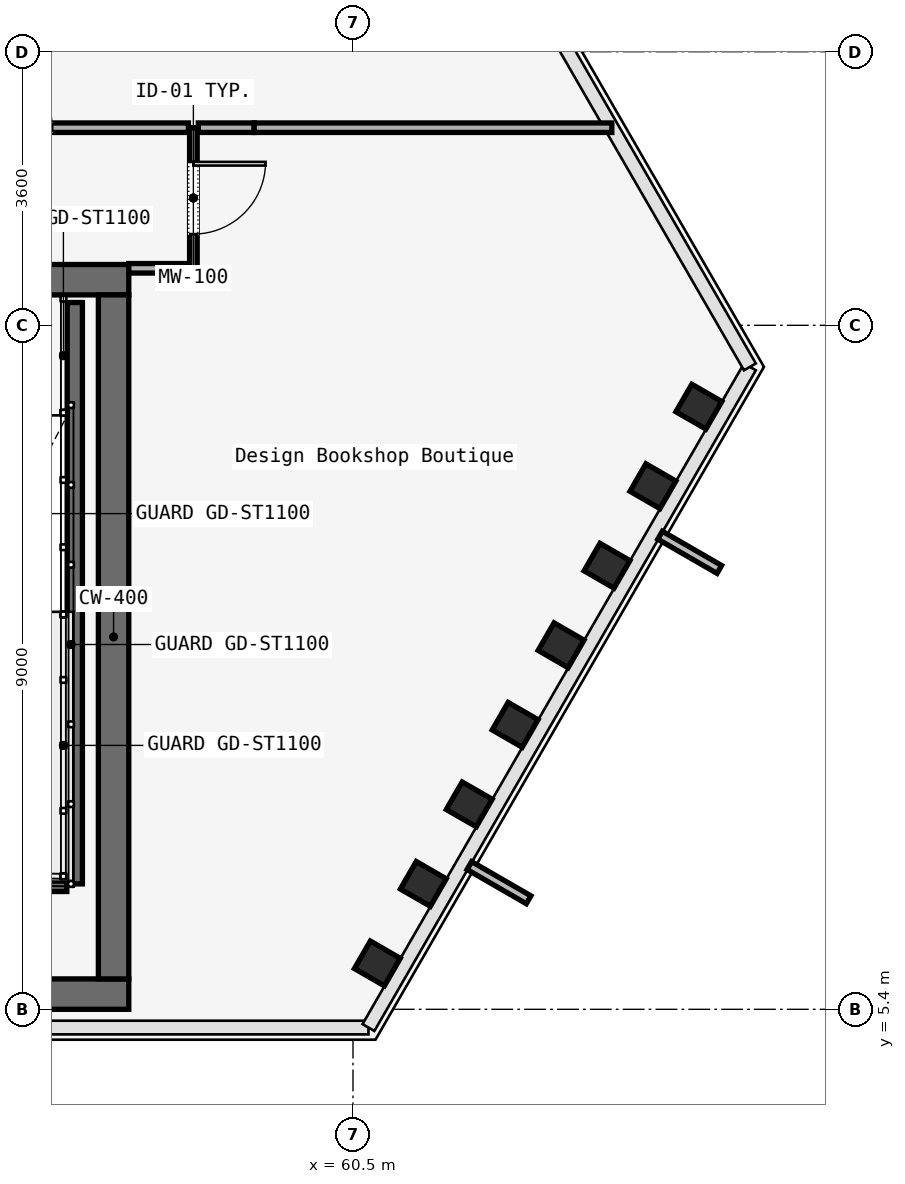
"""IFC4 building model, lengths in metres.
Left out: names, types, materials, properties, quantities, classifications, styles, units other than length and angle.
Written with IfcOpenShell. Run it as: python <this file> out.ifc"""

import sys

from ifc_helpers import new_model, si_unit, direction, frame, frame_2d, origin, origin_2d, place, context, subcontext, project, spatial, rectangle, i_section, extrude, element, fill, save


model = new_model("IFC4")
c1 = context("Model", 3, precision=1e-05, world=origin(), true_north=direction((0.0, 1.0)))
c2 = subcontext(c1, "Body", "Model", "MODEL_VIEW")
j1 = project(units=[si_unit("LENGTHUNIT", "METRE"), si_unit("PLANEANGLEUNIT", "RADIAN")], contexts=[c1])
p1 = place(None, origin())
s1 = spatial("IfcSite", under=j1, at=p1, CompositionType="ELEMENT")
p2 = place(p1, origin())
s2 = spatial("IfcBuilding", under=s1, at=p2, CompositionType="ELEMENT")
p3 = place(p2, frame((0.0, 0.0, 180.2)))
s3 = spatial("IfcBuildingStorey", under=s2, at=p3, CompositionType="ELEMENT", Elevation=180.2)
p4 = place(p3, frame((26.45, 15.0, 0.0), z_axis=(0.0, 0.0, 1.0), x_axis=(1.0, 0.0, 0.0)))
e1 = element("IfcWall", 1, at=p4, inside=s3, PredefinedType="SOLIDWALL", context=c2, shape_type="SweptSolid", body=[
    extrude(rectangle(XDim=31.1, YDim=0.4, at=frame_2d((15.55, 0.0))), origin(), (0.0, 0.0, 1.0), 3.58),
])
p5 = place(p4, frame((1.65, 0.0, 0.0)))
e2 = element("IfcOpeningElement", 2, at=p5, cuts=e1, PredefinedType="OPENING", context=c2, shape_type="SweptSolid", body=[
    extrude(rectangle(XDim=1.1, YDim=2.2, at=frame_2d((0.55, 1.1))), frame((0.0, 0.2, 0.0), z_axis=(0.0, -1.0, 0.0), x_axis=(1.0, 0.0, 0.0)), (0.0, 0.0, 1.0), 0.4),
])
p6 = place(p4, frame((13.65, 0.0, 0.0)))
e3 = element("IfcOpeningElement", 3, at=p6, cuts=e1, PredefinedType="OPENING", context=c2, shape_type="SweptSolid", body=[
    extrude(rectangle(XDim=1.1, YDim=2.2, at=frame_2d((0.55, 1.1))), frame((0.0, 0.2, 0.0), z_axis=(0.0, -1.0, 0.0), x_axis=(1.0, 0.0, 0.0)), (0.0, 0.0, 1.0), 0.4),
])
p7 = place(p4, frame((25.55, 0.0, 0.0)))
e4 = element("IfcOpeningElement", 4, at=p7, cuts=e1, PredefinedType="OPENING", context=c2, shape_type="SweptSolid", body=[
    extrude(rectangle(XDim=1.1, YDim=2.2, at=frame_2d((0.55, 1.1))), frame((0.0, 0.2, 0.0), z_axis=(0.0, -1.0, 0.0), x_axis=(1.0, 0.0, 0.0)), (0.0, 0.0, 1.0), 0.4),
])
p8 = place(p4, frame((10.7, 0.0, 0.0)))
e5 = element("IfcOpeningElement", 5, at=p8, cuts=e1, PredefinedType="OPENING", context=c2, shape_type="SweptSolid", body=[
    extrude(rectangle(XDim=1.4, YDim=2.2, at=frame_2d((0.7, 1.1))), frame((0.0, 0.2, 0.0), z_axis=(0.0, -1.0, 0.0), x_axis=(1.0, 0.0, 0.0)), (0.0, 0.0, 1.0), 0.4),
])
p9 = place(p4, frame((19.35, 0.0, 0.0)))
e6 = element("IfcOpeningElement", 6, at=p9, cuts=e1, PredefinedType="OPENING", context=c2, shape_type="SweptSolid", body=[
    extrude(rectangle(XDim=1.1, YDim=2.2, at=frame_2d((0.55, 1.1))), frame((0.0, 0.2, 0.0), z_axis=(0.0, -1.0, 0.0), x_axis=(1.0, 0.0, 0.0)), (0.0, 0.0, 1.0), 0.4),
])
p10 = place(p4, frame((21.4, 0.0, 0.0)))
e7 = element("IfcOpeningElement", 7, at=p10, cuts=e1, PredefinedType="OPENING", context=c2, shape_type="SweptSolid", body=[
    extrude(rectangle(XDim=0.9, YDim=2.1, at=frame_2d((0.45, 1.05))), frame((0.0, 0.2, 0.0), z_axis=(0.0, -1.0, 0.0), x_axis=(1.0, 0.0, 0.0)), (0.0, 0.0, 1.0), 0.4),
])
p11 = place(p4, frame((23.35, 0.0, 0.0)))
e8 = element("IfcOpeningElement", 8, at=p11, cuts=e1, PredefinedType="OPENING", context=c2, shape_type="SweptSolid", body=[
    extrude(rectangle(XDim=1.3, YDim=2.3, at=frame_2d((0.65, 1.15))), frame((0.0, 0.2, 0.0), z_axis=(0.0, -1.0, 0.0), x_axis=(1.0, 0.0, 0.0)), (0.0, 0.0, 1.0), 0.4),
])
p12 = place(p3, frame((26.45, 5.6, 0.0), z_axis=(0.0, 0.0, 1.0), x_axis=(1.0, 0.0, 0.0)))
e9 = element("IfcWall", 9, at=p12, inside=s3, PredefinedType="SOLIDWALL", context=c2, shape_type="SweptSolid", body=[
    extrude(rectangle(XDim=31.1, YDim=0.4, at=frame_2d((15.55, 0.0))), origin(), (0.0, 0.0, 1.0), 3.58),
])
p13 = place(p3, frame((57.35, 5.8, 0.0), z_axis=(0.0, 0.0, 1.0), x_axis=(0.0, 1.0, 0.0)))
e10 = element("IfcWall", 10, at=p13, inside=s3, PredefinedType="SOLIDWALL", context=c2, shape_type="SweptSolid", body=[
    extrude(rectangle(XDim=9.0, YDim=0.4, at=frame_2d((4.5, 0.0))), origin(), (0.0, 0.0, 1.0), 3.58),
])
p14 = place(p3, frame((60.821, 6.003, 0.0), z_axis=(0.08148987416, -0.008631537964, 0.9966367929), x_axis=(-0.805645164111, 0.588132248959, 0.070967085883)))
e11 = element("IfcColumn", 11, at=p14, inside=s3, PredefinedType="COLUMN", context=c2, shape_type="SweptSolid", body=[
    extrude(i_section(OverallWidth=0.418, OverallDepth=0.455, WebThickness=0.042, FlangeThickness=0.052, FilletRadius=0.015, at=origin_2d()), origin(), (0.0, 0.0, 1.0), 3.592),
])
p15 = place(p3, frame((61.425, 7.05, 0.0), z_axis=(0.071600422233, -0.025702715673, 0.99710217628), x_axis=(-0.643804106231, 0.762348893393, 0.065881997106)))
e12 = element("IfcColumn", 12, at=p15, inside=s3, PredefinedType="COLUMN", context=c2, shape_type="SweptSolid", body=[
    extrude(i_section(OverallWidth=0.418, OverallDepth=0.455, WebThickness=0.042, FlangeThickness=0.052, FilletRadius=0.015, at=origin_2d()), origin(), (0.0, 0.0, 1.0), 3.591),
])
p16 = place(p3, frame((62.029, 8.096, 0.0), z_axis=(0.061677321866, -0.042908919622, 0.997173371377), x_axis=(-0.423353805022, 0.903624703741, 0.065068814049)))
e13 = element("IfcColumn", 13, at=p16, inside=s3, PredefinedType="COLUMN", context=c2, shape_type="SweptSolid", body=[
    extrude(i_section(OverallWidth=0.418, OverallDepth=0.455, WebThickness=0.042, FlangeThickness=0.052, FilletRadius=0.015, at=origin_2d()), origin(), (0.0, 0.0, 1.0), 3.59),
])
p17 = place(p3, frame((62.634, 9.143, 0.0), z_axis=(0.051732394195, -0.060093871838, 0.996851285779), x_axis=(-0.184296323413, 0.980468882548, 0.068670485153)))
e14 = element("IfcColumn", 14, at=p17, inside=s3, PredefinedType="COLUMN", context=c2, shape_type="SweptSolid", body=[
    extrude(i_section(OverallWidth=0.418, OverallDepth=0.455, WebThickness=0.042, FlangeThickness=0.052, FilletRadius=0.015, at=origin_2d()), origin(), (0.0, 0.0, 1.0), 3.591),
])
p18 = place(p3, frame((63.238, 10.19, 0.0), z_axis=(0.041845245967, -0.077237085495, 0.996134231926), x_axis=(0.028682489394, 0.996689455554, 0.076075252148)))
e15 = element("IfcColumn", 15, at=p18, inside=s3, PredefinedType="COLUMN", context=c2, shape_type="SweptSolid", body=[
    extrude(i_section(OverallWidth=0.418, OverallDepth=0.455, WebThickness=0.042, FlangeThickness=0.052, FilletRadius=0.015, at=origin_2d()), origin(), (0.0, 0.0, 1.0), 3.594),
])
p19 = place(p3, frame((63.842, 11.236, 0.0), z_axis=(0.031892225562, -0.094251704904, 0.995037437522), x_axis=(0.197419018673, 0.976524632367, 0.086170606627)))
e16 = element("IfcColumn", 16, at=p19, inside=s3, PredefinedType="COLUMN", context=c2, shape_type="SweptSolid", body=[
    extrude(i_section(OverallWidth=0.418, OverallDepth=0.455, WebThickness=0.042, FlangeThickness=0.052, FilletRadius=0.015, at=origin_2d()), origin(), (0.0, 0.0, 1.0), 3.598),
])
p20 = place(p3, frame((64.446, 12.283, 0.0), z_axis=(0.021952406757, -0.111252629304, 0.993549668769), x_axis=(0.323971098461, 0.940956128411, 0.098205355084)))
e17 = element("IfcColumn", 17, at=p20, inside=s3, PredefinedType="COLUMN", context=c2, shape_type="SweptSolid", body=[
    extrude(i_section(OverallWidth=0.418, OverallDepth=0.455, WebThickness=0.042, FlangeThickness=0.052, FilletRadius=0.015, at=origin_2d()), origin(), (0.0, 0.0, 1.0), 3.603),
])
p21 = place(p3, frame((65.051, 13.33, 0.0), z_axis=(0.012037594099, -0.1281530383, 0.991681347562), x_axis=(0.417491976422, 0.901817260286, 0.111472322452)))
e18 = element("IfcColumn", 18, at=p21, inside=s3, PredefinedType="COLUMN", context=c2, shape_type="SweptSolid", body=[
    extrude(i_section(OverallWidth=0.418, OverallDepth=0.455, WebThickness=0.042, FlangeThickness=0.052, FilletRadius=0.015, at=origin_2d()), origin(), (0.0, 0.0, 1.0), 3.61),
])
p22 = place(p3, frame((56.84, 14.7, 0.0), z_axis=(0.0, 0.0, 1.0), x_axis=(0.0, -1.0, 0.0)))
e19 = element("IfcWall", 19, at=p22, inside=s3, PredefinedType="SOLIDWALL", context=c2, shape_type="SweptSolid", body=[
    extrude(rectangle(XDim=7.65, YDim=0.2, at=frame_2d((3.825, 0.0))), origin(), (0.0, 0.0, 1.0), 3.8),
])
p23 = place(p3, frame((53.62, 7.05, 0.0), z_axis=(0.0, 0.0, 1.0), x_axis=(1.0, 0.0, 0.0)))
e20 = element("IfcWall", 20, at=p23, inside=s3, PredefinedType="SOLIDWALL", context=c2, shape_type="SweptSolid", body=[
    extrude(rectangle(XDim=3.115, YDim=0.2, at=frame_2d((1.558, 0.0))), origin(), (0.0, 0.0, 1.0), 3.8),
])
p24 = place(p3, frame((58.4, 17.0, 0.0), z_axis=(0.0, 0.0, 1.0), x_axis=(0.0, -1.0, 0.0)))
e21 = element("IfcWall", 21, at=p24, inside=s3, PredefinedType="MOVABLE", context=c2, shape_type="SweptSolid", body=[
    extrude(rectangle(XDim=1.85, YDim=0.1, at=frame_2d((0.925, 0.0))), origin(), (0.0, 0.0, 1.0), 3.01),
])
p25 = place(p24, frame((0.45, 0.0, 0.0)))
e22 = element("IfcOpeningElement", 22, at=p25, cuts=e21, PredefinedType="OPENING", context=c2, shape_type="SweptSolid", body=[
    extrude(rectangle(XDim=0.95, YDim=2.2, at=frame_2d((0.475, 1.1))), frame((0.0, 0.05, 0.0), z_axis=(0.0, -1.0, 0.0), x_axis=(1.0, 0.0, 0.0)), (0.0, 0.0, 1.0), 0.1),
])
p26 = place(p3, frame((58.335, 15.15, 0.0), z_axis=(0.0, 0.0, 1.0), x_axis=(-1.0, 0.0, 0.0)))
e23 = element("IfcWall", 23, at=p26, inside=s3, PredefinedType="PARTITIONING", context=c2, shape_type="SweptSolid", body=[
    extrude(rectangle(XDim=0.785, YDim=0.125, at=frame_2d((0.393, 0.0))), origin(), (0.0, 0.0, 1.0), 3.01),
])
p27 = place(p3, frame((53.8, 17.0, 0.0), z_axis=(0.0, 0.0, 1.0), x_axis=(1.0, 0.0, 0.0)))
e24 = element("IfcWall", 24, at=p27, inside=s3, PredefinedType="PARTITIONING", context=c2, shape_type="SweptSolid", body=[
    extrude(rectangle(XDim=4.535, YDim=0.125, at=frame_2d((2.268, 0.0))), origin(), (0.0, 0.0, 1.0), 3.01),
])
p28 = place(p27, frame((1.792, 0.0, 0.0)))
e25 = element("IfcOpeningElement", 25, at=p28, cuts=e24, PredefinedType="OPENING", context=c2, shape_type="SweptSolid", body=[
    extrude(rectangle(XDim=0.95, YDim=2.2, at=frame_2d((0.475, 1.1))), frame((0.0, 0.062, 0.0), z_axis=(0.0, -1.0, 0.0), x_axis=(1.0, 0.0, 0.0)), (0.0, 0.0, 1.0), 0.125),
])
p29 = place(p3, frame((58.465, 17.0, 0.0), z_axis=(0.0, 0.0, 1.0), x_axis=(1.0, 0.0, 0.0)))
e26 = element("IfcWall", 26, at=p29, inside=s3, PredefinedType="PARTITIONING", context=c2, shape_type="SweptSolid", body=[
    extrude(rectangle(XDim=0.735, YDim=0.125, at=frame_2d((0.367, 0.0))), origin(), (0.0, 0.0, 1.0), 3.01),
])
p30 = place(p3, frame((59.2, 17.0, 0.0), z_axis=(0.0, 0.0, 1.0), x_axis=(1.0, 0.0, 0.0)))
e27 = element("IfcWall", 27, at=p30, inside=s3, PredefinedType="PARTITIONING", context=c2, shape_type="SweptSolid", body=[
    extrude(rectangle(XDim=4.705, YDim=0.125, at=frame_2d((2.353, 0.0))), origin(), (0.0, 0.0, 1.0), 3.01),
])
p31 = place(p25, origin())
e28 = element("IfcDoor", 28, at=p31, inside=s3, OperationType="SINGLE_SWING_LEFT", PredefinedType="DOOR", context=c2, shape_type="SweptSolid", body=[
    extrude(rectangle(XDim=0.95, YDim=2.2, at=frame_2d((0.475, 1.1))), frame((0.0, 0.025, 0.0), z_axis=(0.0, -1.0, 0.0), x_axis=(1.0, 0.0, 0.0)), (0.0, 0.0, 1.0), 0.05),
])
fill(e22, e28)
save(model, sys.argv[1])
